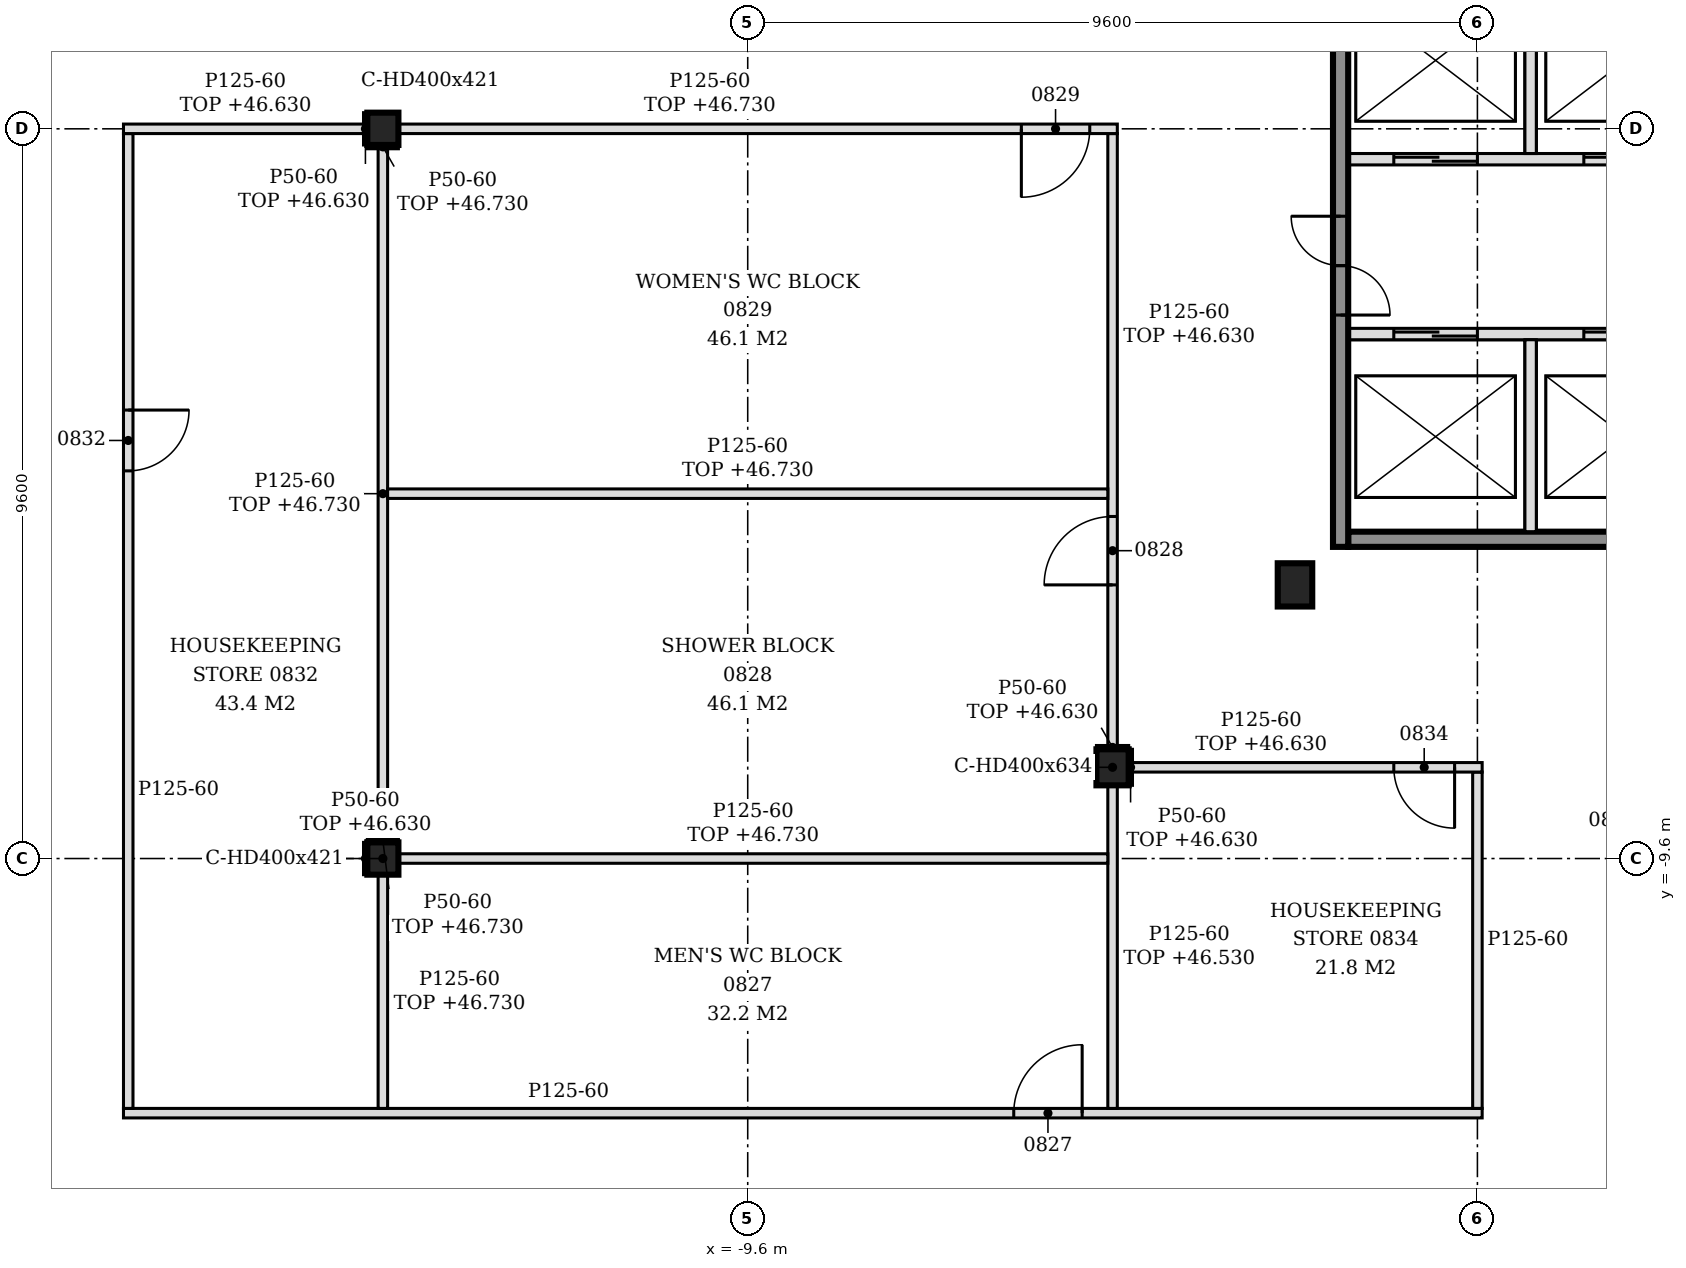
"""IFC4 building model, lengths in metres.
Left out: names, types, materials, properties, quantities, classifications, styles, units other than length and angle.
Written with IfcOpenShell. Run it as: python <this file> out.ifc"""

import sys

from ifc_helpers import new_model, si_unit, direction, frame, frame_2d, origin, origin_2d, place, context, subcontext, project, spatial, polyline, rectangle, i_section, outline, extrude, element, fill, save


model = new_model("IFC4")
c1 = context("Model", 3, precision=1e-05, world=origin(), true_north=direction((0.0, 1.0)))
c2 = subcontext(c1, "Body", "Model", "MODEL_VIEW")
j1 = project(units=[si_unit("LENGTHUNIT", "METRE"), si_unit("PLANEANGLEUNIT", "RADIAN")], contexts=[c1])
p1 = place(None, origin())
s1 = spatial("IfcSite", under=j1, at=p1, CompositionType="ELEMENT")
p2 = place(p1, origin())
s2 = spatial("IfcBuilding", under=s1, at=p2, CompositionType="ELEMENT")
p3 = place(p2, frame((0.0, 0.0, 43.8)))
s3 = spatial("IfcBuildingStorey", under=s2, at=p3, CompositionType="ELEMENT", Elevation=43.8)
p4 = place(p3, frame((-4.8, -8.4, -0.15), z_axis=(0.0, 0.0, 1.0), x_axis=(1.0, 0.0, 0.0)))
e1 = element("IfcColumn", 1, at=p4, inside=s3, PredefinedType="COLUMN", context=c2, shape_type="SweptSolid", body=[
    extrude(i_section(OverallWidth=0.424, OverallDepth=0.474, WebThickness=0.048, FlangeThickness=0.077, FilletRadius=0.015, at=origin_2d()), origin(), (0.0, 0.0, 1.0), 3.6),
])
p5 = place(p3, frame((-2.4, -6.0, -0.15), z_axis=(0.0, 0.0, 1.0), x_axis=(1.0, 0.0, 0.0)))
e2 = element("IfcColumn", 2, at=p5, inside=s3, PredefinedType="COLUMN", context=c2, shape_type="SweptSolid", body=[
    extrude(i_section(OverallWidth=0.454, OverallDepth=0.569, WebThickness=0.078, FlangeThickness=0.125, FilletRadius=0.015, at=origin_2d()), origin(), (0.0, 0.0, 1.0), 3.6),
])
for number, where, z_axis, x_axis in (
    (3, (-14.4, -9.6, -0.15), (0.0, 0.0, 1.0), (1.0, 0.0, 0.0)),
    (4, (-14.4, 0.0, -0.15), (0.0, 0.0, 1.0), (1.0, 0.0, 0.0)),
):
    element("IfcColumn", number, at=place(p3, frame(where, z_axis=z_axis, x_axis=x_axis)), inside=s3, PredefinedType="COLUMN", context=c2, shape_type="SweptSolid", body=[
        extrude(i_section(OverallWidth=0.409, OverallDepth=0.425, WebThickness=0.033, FlangeThickness=0.052, FilletRadius=0.015, at=origin_2d()), origin(), (0.0, 0.0, 1.0), 3.6),
    ])
p6 = place(p3, frame((-1.7, -5.4, 0.0), z_axis=(0.0, 0.0, 1.0), x_axis=(1.0, 0.0, 0.0)))
e5 = element("IfcWall", 5, at=p6, inside=s3, PredefinedType="SOLIDWALL", context=c2, shape_type="SweptSolid", body=[
    extrude(rectangle(XDim=7.9, YDim=0.2, at=frame_2d((3.95, 0.0))), origin(), (0.0, 0.0, 1.0), 3.45),
])
p7 = place(p3, frame((-1.7, -2.7, 0.0), z_axis=(0.0, 0.0, 1.0), x_axis=(1.0, 0.0, 0.0)))
e6 = element("IfcWall", 6, at=p7, inside=s3, PredefinedType="SOLIDWALL", context=c2, shape_type="SweptSolid", body=[
    extrude(rectangle(XDim=7.9, YDim=0.15, at=frame_2d((3.95, 0.0))), origin(), (0.0, 0.0, 1.0), 3.45),
])
p8 = place(p7, frame((0.6, 0.0, 0.0)))
e7 = element("IfcOpeningElement", 7, at=p8, cuts=e6, PredefinedType="OPENING", context=c2, shape_type="SweptSolid", body=[
    extrude(rectangle(XDim=1.1, YDim=2.1, at=frame_2d((0.55, 1.05))), frame((0.0, 0.085, 0.0), z_axis=(0.0, -1.0, 0.0), x_axis=(1.0, 0.0, 0.0)), (0.0, 0.0, 1.0), 0.17),
])
p9 = place(p7, frame((3.1, 0.0, 0.0)))
e8 = element("IfcOpeningElement", 8, at=p9, cuts=e6, PredefinedType="OPENING", context=c2, shape_type="SweptSolid", body=[
    extrude(rectangle(XDim=1.1, YDim=2.1, at=frame_2d((0.55, 1.05))), frame((0.0, 0.085, 0.0), z_axis=(0.0, -1.0, 0.0), x_axis=(1.0, 0.0, 0.0)), (0.0, 0.0, 1.0), 0.17),
])
p10 = place(p3, frame((-1.7, -0.4, 0.0), z_axis=(0.0, 0.0, 1.0), x_axis=(1.0, 0.0, 0.0)))
e9 = element("IfcWall", 9, at=p10, inside=s3, PredefinedType="SOLIDWALL", context=c2, shape_type="SweptSolid", body=[
    extrude(rectangle(XDim=15.925, YDim=0.15, at=frame_2d((7.962, 0.0))), origin(), (0.0, 0.0, 1.0), 3.45),
])
p11 = place(p10, frame((0.6, 0.0, 0.0)))
e10 = element("IfcOpeningElement", 10, at=p11, cuts=e9, PredefinedType="OPENING", context=c2, shape_type="SweptSolid", body=[
    extrude(rectangle(XDim=1.1, YDim=2.1, at=frame_2d((0.55, 1.05))), frame((0.0, 0.085, 0.0), z_axis=(0.0, -1.0, 0.0), x_axis=(1.0, 0.0, 0.0)), (0.0, 0.0, 1.0), 0.17),
])
p12 = place(p10, frame((3.1, 0.0, 0.0)))
e11 = element("IfcOpeningElement", 11, at=p12, cuts=e9, PredefinedType="OPENING", context=c2, shape_type="SweptSolid", body=[
    extrude(rectangle(XDim=1.1, YDim=2.1, at=frame_2d((0.55, 1.05))), frame((0.0, 0.085, 0.0), z_axis=(0.0, -1.0, 0.0), x_axis=(1.0, 0.0, 0.0)), (0.0, 0.0, 1.0), 0.17),
])
p13 = place(p10, frame((11.575, 0.0, 0.0)))
e12 = element("IfcOpeningElement", 12, at=p13, cuts=e9, PredefinedType="OPENING", context=c2, shape_type="SweptSolid", body=[
    extrude(rectangle(XDim=1.2, YDim=2.1, at=frame_2d((0.6, 1.05))), frame((0.0, 0.085, 0.0), z_axis=(0.0, -1.0, 0.0), x_axis=(1.0, 0.0, 0.0)), (0.0, 0.0, 1.0), 0.17),
])
p14 = place(p10, frame((14.125, 0.0, 0.0)))
e13 = element("IfcOpeningElement", 13, at=p14, cuts=e9, PredefinedType="OPENING", context=c2, shape_type="SweptSolid", body=[
    extrude(rectangle(XDim=1.2, YDim=2.1, at=frame_2d((0.6, 1.05))), frame((0.0, 0.085, 0.0), z_axis=(0.0, -1.0, 0.0), x_axis=(1.0, 0.0, 0.0)), (0.0, 0.0, 1.0), 0.17),
])
p15 = place(p3, frame((-1.8, -5.5, 0.0), z_axis=(0.0, 0.0, 1.0), x_axis=(0.0, 1.0, 0.0)))
e14 = element("IfcWall", 14, at=p15, inside=s3, PredefinedType="SOLIDWALL", context=c2, shape_type="SweptSolid", body=[
    extrude(rectangle(XDim=15.8, YDim=0.2, at=frame_2d((7.9, 0.0))), origin(), (0.0, 0.0, 1.0), 3.45),
])
p16 = place(p15, frame((3.05, 0.0, 0.0)))
e15 = element("IfcOpeningElement", 15, at=p16, cuts=e14, PredefinedType="OPENING", context=c2, shape_type="SweptSolid", body=[
    extrude(rectangle(XDim=1.3, YDim=2.1, at=frame_2d((0.65, 1.05))), frame((0.0, 0.11, 0.0), z_axis=(0.0, -1.0, 0.0), x_axis=(1.0, 0.0, 0.0)), (0.0, 0.0, 1.0), 0.22),
])
p17 = place(p15, frame((11.45, 0.0, 0.0)))
e16 = element("IfcOpeningElement", 16, at=p17, cuts=e14, PredefinedType="OPENING", context=c2, shape_type="SweptSolid", body=[
    extrude(rectangle(XDim=1.3, YDim=2.1, at=frame_2d((0.65, 1.05))), frame((0.0, 0.11, 0.0), z_axis=(0.0, -1.0, 0.0), x_axis=(1.0, 0.0, 0.0)), (0.0, 0.0, 1.0), 0.22),
])
p18 = place(p3, frame((0.7, -5.3, 0.0), z_axis=(0.0, 0.0, 1.0), x_axis=(0.0, 1.0, 0.0)))
e17 = element("IfcWall", 17, at=p18, inside=s3, PredefinedType="SOLIDWALL", context=c2, shape_type="SweptSolid", body=[
    extrude(rectangle(XDim=2.525, YDim=0.15, at=frame_2d((1.263, 0.0))), origin(), (0.0, 0.0, 1.0), 3.45),
])
p19 = place(p3, frame((0.7, -0.325, 0.0), z_axis=(0.0, 0.0, 1.0), x_axis=(0.0, 1.0, 0.0)))
e18 = element("IfcWall", 18, at=p19, inside=s3, PredefinedType="SOLIDWALL", context=c2, shape_type="SweptSolid", body=[
    extrude(rectangle(XDim=2.45, YDim=0.15, at=frame_2d((1.225, 0.0))), origin(), (0.0, 0.0, 1.0), 3.45),
])
p20 = place(p3, frame((-17.812, -12.95, 0.0), z_axis=(0.0, 0.0, 1.0), x_axis=(1.0, 0.0, 0.0)))
e19 = element("IfcWall", 19, at=p20, inside=s3, PredefinedType="PARTITIONING", context=c2, shape_type="SweptSolid", body=[
    extrude(outline(polyline([(0.0, 0.0), (17.875, 0.0), (17.875, 3.45), (13.163, 3.45), (13.16, 2.73), (12.863, 2.73), (12.861, 3.45), (3.562, 3.45), (3.561, 2.93), (3.262, 2.93), (3.26, 3.45), (0.0, 3.45), (0.0, 0.0)])), frame((0.0, 0.062, 0.0), z_axis=(0.0, -1.0, 0.0), x_axis=(1.0, 0.0, 0.0)), (0.0, 0.0, 1.0), 0.125),
])
p21 = place(p20, frame((11.712, 0.0, 0.0)))
e20 = element("IfcOpeningElement", 20, at=p21, cuts=e19, PredefinedType="OPENING", context=c2, shape_type="SweptSolid", body=[
    extrude(rectangle(XDim=0.9, YDim=2.1, at=frame_2d((0.45, 1.05))), frame((0.0, 0.073, 0.0), z_axis=(0.0, -1.0, 0.0), x_axis=(1.0, 0.0, 0.0)), (0.0, 0.0, 1.0), 0.145),
])
p22 = place(p3, frame((-17.75, -12.887, 0.0), z_axis=(0.0, 0.0, 1.0), x_axis=(0.0, 1.0, 0.0)))
e21 = element("IfcWall", 21, at=p22, inside=s3, PredefinedType="PARTITIONING", context=c2, shape_type="SweptSolid", body=[
    extrude(outline(polyline([(0.0, 0.0), (12.825, 0.0), (12.825, 2.83), (12.778, 2.83), (12.775, 3.45), (8.198, 3.45), (8.196, 2.83), (7.978, 2.83), (7.976, 3.45), (3.397, 3.45), (3.396, 2.83), (3.177, 2.83), (3.176, 3.45), (0.0, 3.45), (0.0, 0.0)])), frame((0.0, 0.062, 0.0), z_axis=(0.0, -1.0, 0.0), x_axis=(1.0, 0.0, 0.0)), (0.0, 0.0, 1.0), 0.125),
])
p23 = place(p22, frame((8.387, 0.0, 0.0)))
e22 = element("IfcOpeningElement", 22, at=p23, cuts=e21, PredefinedType="OPENING", context=c2, shape_type="SweptSolid", body=[
    extrude(rectangle(XDim=0.8, YDim=2.1, at=frame_2d((0.4, 1.05))), frame((0.0, 0.073, 0.0), z_axis=(0.0, -1.0, 0.0), x_axis=(1.0, 0.0, 0.0)), (0.0, 0.0, 1.0), 0.145),
])
p24 = place(p3, frame((-14.4, -12.887, 0.0), z_axis=(0.0, 0.0, 1.0), x_axis=(0.0, 1.0, 0.0)))
e23 = element("IfcWall", 23, at=p24, inside=s3, PredefinedType="PARTITIONING", context=c2, shape_type="SweptSolid", body=[
    extrude(rectangle(XDim=3.075, YDim=0.125, at=frame_2d((1.538, 0.0))), origin(), (0.0, 0.0, 1.0), 2.93),
])
p25 = place(p3, frame((-4.8, -12.887, 0.0), z_axis=(0.0, 0.0, 1.0), x_axis=(0.0, 1.0, 0.0)))
e24 = element("IfcWall", 24, at=p25, inside=s3, PredefinedType="PARTITIONING", context=c2, shape_type="SweptSolid", body=[
    extrude(rectangle(XDim=4.25, YDim=0.125, at=frame_2d((2.125, 0.0))), origin(), (0.0, 0.0, 1.0), 2.73),
])
p26 = place(p3, frame((0.0, -12.887, 0.0), z_axis=(0.0, 0.0, 1.0), x_axis=(0.0, 1.0, 0.0)))
e25 = element("IfcWall", 25, at=p26, inside=s3, PredefinedType="PARTITIONING", context=c2, shape_type="SweptSolid", body=[
    extrude(outline(polyline([(0.0, 0.0), (4.425, 0.0), (4.425, 2.83), (4.337, 2.83), (4.335, 3.45), (0.0, 3.45), (0.0, 0.0)])), frame((0.0, 0.062, 0.0), z_axis=(0.0, -1.0, 0.0), x_axis=(1.0, 0.0, 0.0)), (0.0, 0.0, 1.0), 0.125),
])
p27 = place(p3, frame((-14.196, -9.6, 0.0), z_axis=(0.0, 0.0, 1.0), x_axis=(1.0, 0.0, 0.0)))
e26 = element("IfcWall", 26, at=p27, inside=s3, PredefinedType="PARTITIONING", context=c2, shape_type="SweptSolid", body=[
    extrude(outline(polyline([(0.0, 0.0), (9.333, 0.0), (9.333, 2.73), (9.246, 2.73), (9.243, 2.93), (0.0, 2.93), (0.0, 0.0)])), frame((0.0, 0.062, 0.0), z_axis=(0.0, -1.0, 0.0), x_axis=(1.0, 0.0, 0.0)), (0.0, 0.0, 1.0), 0.125),
])
p28 = place(p3, frame((-14.4, -9.387, 0.0), z_axis=(0.0, 0.0, 1.0), x_axis=(0.0, 1.0, 0.0)))
e27 = element("IfcWall", 27, at=p28, inside=s3, PredefinedType="PARTITIONING", context=c2, shape_type="SweptSolid", body=[
    extrude(rectangle(XDim=9.175, YDim=0.125, at=frame_2d((4.587, 0.0))), origin(), (0.0, 0.0, 1.0), 2.93),
])
p29 = place(p3, frame((-4.588, -8.4, 0.0), z_axis=(0.0, 0.0, 1.0), x_axis=(1.0, 0.0, 0.0)))
e28 = element("IfcWall", 28, at=p29, inside=s3, PredefinedType="PARTITIONING", context=c2, shape_type="SweptSolid", body=[
    extrude(rectangle(XDim=4.65, YDim=0.125, at=frame_2d((2.325, 0.0))), origin(), (0.0, 0.0, 1.0), 2.83),
])
p30 = place(p29, frame((3.488, 0.0, 0.0)))
e29 = element("IfcOpeningElement", 29, at=p30, cuts=e28, PredefinedType="OPENING", context=c2, shape_type="SweptSolid", body=[
    extrude(rectangle(XDim=0.8, YDim=2.1, at=frame_2d((0.4, 1.05))), frame((0.0, 0.073, 0.0), z_axis=(0.0, -1.0, 0.0), x_axis=(1.0, 0.0, 0.0)), (0.0, 0.0, 1.0), 0.145),
])
p31 = place(p3, frame((-4.8, -8.163, 0.0), z_axis=(0.0, 0.0, 1.0), x_axis=(0.0, 1.0, 0.0)))
e30 = element("IfcWall", 30, at=p31, inside=s3, PredefinedType="PARTITIONING", context=c2, shape_type="SweptSolid", body=[
    extrude(rectangle(XDim=8.101, YDim=0.125, at=frame_2d((4.05, 0.0))), origin(), (0.0, 0.0, 1.0), 2.83),
])
p32 = place(p31, frame((2.163, 0.0, 0.0)))
e31 = element("IfcOpeningElement", 31, at=p32, cuts=e30, PredefinedType="OPENING", context=c2, shape_type="SweptSolid", body=[
    extrude(rectangle(XDim=0.9, YDim=2.1, at=frame_2d((0.45, 1.05))), frame((0.0, 0.073, 0.0), z_axis=(0.0, -1.0, 0.0), x_axis=(1.0, 0.0, 0.0)), (0.0, 0.0, 1.0), 0.145),
])
p33 = place(p3, frame((-14.337, -4.8, 0.0), z_axis=(0.0, 0.0, 1.0), x_axis=(1.0, 0.0, 0.0)))
e32 = element("IfcWall", 32, at=p33, inside=s3, PredefinedType="PARTITIONING", context=c2, shape_type="SweptSolid", body=[
    extrude(outline(polyline([(0.0, 0.0), (9.475, 0.0), (9.475, 2.83), (9.387, 2.83), (9.385, 2.93), (0.0, 2.93), (0.0, 0.0)])), frame((0.0, 0.062, 0.0), z_axis=(0.0, -1.0, 0.0), x_axis=(1.0, 0.0, 0.0)), (0.0, 0.0, 1.0), 0.125),
])
p34 = place(p3, frame((-17.812, 0.0, 0.0), z_axis=(0.0, 0.0, 1.0), x_axis=(1.0, 0.0, 0.0)))
e33 = element("IfcWall", 33, at=p34, inside=s3, PredefinedType="PARTITIONING", context=c2, shape_type="SweptSolid", body=[
    extrude(rectangle(XDim=3.208, YDim=0.125, at=frame_2d((1.604, 0.0))), origin(), (0.0, 0.0, 1.0), 2.83),
])
p35 = place(p3, frame((-14.196, 0.0, 0.0), z_axis=(0.0, 0.0, 1.0), x_axis=(1.0, 0.0, 0.0)))
e34 = element("IfcWall", 34, at=p35, inside=s3, PredefinedType="PARTITIONING", context=c2, shape_type="SweptSolid", body=[
    extrude(outline(polyline([(0.0, 0.0), (9.458, 0.0), (9.458, 2.83), (9.246, 2.83), (9.243, 2.93), (0.0, 2.93), (0.0, 0.0)])), frame((0.0, 0.062, 0.0), z_axis=(0.0, -1.0, 0.0), x_axis=(1.0, 0.0, 0.0)), (0.0, 0.0, 1.0), 0.125),
])
p36 = place(p35, frame((8.196, 0.0, 0.0)))
e35 = element("IfcOpeningElement", 35, at=p36, cuts=e34, PredefinedType="OPENING", context=c2, shape_type="SweptSolid", body=[
    extrude(rectangle(XDim=0.9, YDim=2.1, at=frame_2d((0.45, 1.05))), frame((0.0, 0.073, 0.0), z_axis=(0.0, -1.0, 0.0), x_axis=(1.0, 0.0, 0.0)), (0.0, 0.0, 1.0), 0.145),
])
p37 = place(p3, frame((-14.629, -9.812, 0.0), z_axis=(0.0, 0.0, 1.0), x_axis=(0.0, 1.0, 0.0)))
e36 = element("IfcWall", 36, at=p37, inside=s3, PredefinedType="PARTITIONING", context=c2, shape_type="SweptSolid", body=[
    extrude(rectangle(XDim=0.425, YDim=0.05, at=frame_2d((0.212, 0.0))), origin(), (0.0, 0.0, 1.0), 2.83),
])
p38 = place(p3, frame((-14.629, -0.212, 0.0), z_axis=(0.0, 0.0, 1.0), x_axis=(0.0, 1.0, 0.0)))
e37 = element("IfcWall", 37, at=p38, inside=s3, PredefinedType="PARTITIONING", context=c2, shape_type="SweptSolid", body=[
    extrude(rectangle(XDim=0.425, YDim=0.05, at=frame_2d((0.212, 0.0))), origin(), (0.0, 0.0, 1.0), 2.83),
])
p39 = place(p3, frame((-4.563, -8.637, 0.0), z_axis=(0.0, 0.0, 1.0), x_axis=(0.0, 1.0, 0.0)))
e38 = element("IfcWall", 38, at=p39, inside=s3, PredefinedType="PARTITIONING", context=c2, shape_type="SweptSolid", body=[
    extrude(rectangle(XDim=0.474, YDim=0.05, at=frame_2d((0.237, 0.0))), origin(), (0.0, 0.0, 1.0), 2.83),
])
p40 = place(p3, frame((-14.604, -9.363, 0.0), z_axis=(0.0, 0.0, 1.0), x_axis=(1.0, 0.0, 0.0)))
e39 = element("IfcWall", 39, at=p40, inside=s3, PredefinedType="PARTITIONING", context=c2, shape_type="SweptSolid", body=[
    extrude(rectangle(XDim=0.409, YDim=0.05, at=frame_2d((0.205, 0.0))), origin(), (0.0, 0.0, 1.0), 2.93),
])
p41 = place(p3, frame((-5.012, -8.138, 0.0), z_axis=(0.0, 0.0, 1.0), x_axis=(1.0, 0.0, 0.0)))
e40 = element("IfcWall", 40, at=p41, inside=s3, PredefinedType="PARTITIONING", context=c2, shape_type="SweptSolid", body=[
    extrude(rectangle(XDim=0.424, YDim=0.05, at=frame_2d((0.212, 0.0))), origin(), (0.0, 0.0, 1.0), 2.83),
])
p42 = place(p3, frame((-14.604, -0.238, 0.0), z_axis=(0.0, 0.0, 1.0), x_axis=(1.0, 0.0, 0.0)))
e41 = element("IfcWall", 41, at=p42, inside=s3, PredefinedType="PARTITIONING", context=c2, shape_type="SweptSolid", body=[
    extrude(rectangle(XDim=0.409, YDim=0.05, at=frame_2d((0.205, 0.0))), origin(), (0.0, 0.0, 1.0), 2.93),
])
p43 = place(p8, origin())
e42 = element("IfcDoor", 42, at=p43, inside=s3, OperationType="DOUBLE_DOOR_SLIDING", PredefinedType="DOOR", context=c2, shape_type="SweptSolid", body=[
    extrude(rectangle(XDim=1.1, YDim=2.1, at=frame_2d((0.55, 1.05))), frame((0.0, 0.025, 0.0), z_axis=(0.0, -1.0, 0.0), x_axis=(1.0, 0.0, 0.0)), (0.0, 0.0, 1.0), 0.05),
])
fill(e7, e42)
p44 = place(p9, origin())
e43 = element("IfcDoor", 43, at=p44, inside=s3, OperationType="DOUBLE_DOOR_SLIDING", PredefinedType="DOOR", context=c2, shape_type="SweptSolid", body=[
    extrude(rectangle(XDim=1.1, YDim=2.1, at=frame_2d((0.55, 1.05))), frame((0.0, 0.025, 0.0), z_axis=(0.0, -1.0, 0.0), x_axis=(1.0, 0.0, 0.0)), (0.0, 0.0, 1.0), 0.05),
])
fill(e8, e43)
p45 = place(p11, origin())
e44 = element("IfcDoor", 44, at=p45, inside=s3, OperationType="DOUBLE_DOOR_SLIDING", PredefinedType="DOOR", context=c2, shape_type="SweptSolid", body=[
    extrude(rectangle(XDim=1.1, YDim=2.1, at=frame_2d((0.55, 1.05))), frame((0.0, 0.025, 0.0), z_axis=(0.0, -1.0, 0.0), x_axis=(1.0, 0.0, 0.0)), (0.0, 0.0, 1.0), 0.05),
])
fill(e10, e44)
p46 = place(p12, origin())
e45 = element("IfcDoor", 45, at=p46, inside=s3, OperationType="DOUBLE_DOOR_SLIDING", PredefinedType="DOOR", context=c2, shape_type="SweptSolid", body=[
    extrude(rectangle(XDim=1.1, YDim=2.1, at=frame_2d((0.55, 1.05))), frame((0.0, 0.025, 0.0), z_axis=(0.0, -1.0, 0.0), x_axis=(1.0, 0.0, 0.0)), (0.0, 0.0, 1.0), 0.05),
])
fill(e11, e45)
p47 = place(p16, origin())
e46 = element("IfcDoor", 46, at=p47, inside=s3, OperationType="DOUBLE_DOOR_SINGLE_SWING", PredefinedType="DOOR", context=c2, shape_type="SweptSolid", body=[
    extrude(rectangle(XDim=1.3, YDim=2.1, at=frame_2d((0.65, 1.05))), frame((0.0, 0.025, 0.0), z_axis=(0.0, -1.0, 0.0), x_axis=(1.0, 0.0, 0.0)), (0.0, 0.0, 1.0), 0.05),
])
fill(e15, e46)
p48 = place(p21, origin())
e47 = element("IfcDoor", 47, at=p48, inside=s3, OperationType="SINGLE_SWING_RIGHT", PredefinedType="DOOR", context=c2, shape_type="SweptSolid", body=[
    extrude(rectangle(XDim=0.9, YDim=2.1, at=frame_2d((0.45, 1.05))), frame((0.0, 0.025, 0.0), z_axis=(0.0, -1.0, 0.0), x_axis=(1.0, 0.0, 0.0)), (0.0, 0.0, 1.0), 0.05),
])
fill(e20, e47)
p49 = place(p32, origin())
e48 = element("IfcDoor", 48, at=p49, inside=s3, OperationType="SINGLE_SWING_LEFT", PredefinedType="DOOR", context=c2, shape_type="SweptSolid", body=[
    extrude(rectangle(XDim=0.9, YDim=2.1, at=frame_2d((0.45, 1.05))), frame((0.0, 0.025, 0.0), z_axis=(0.0, -1.0, 0.0), x_axis=(1.0, 0.0, 0.0)), (0.0, 0.0, 1.0), 0.05),
])
fill(e31, e48)
p50 = place(p36, frame((0.9, 0.0, 0.0), z_axis=(0.0, 0.0, 1.0), x_axis=(-1.0, 0.0, 0.0)))
e49 = element("IfcDoor", 49, at=p50, inside=s3, OperationType="SINGLE_SWING_RIGHT", PredefinedType="DOOR", context=c2, shape_type="SweptSolid", body=[
    extrude(rectangle(XDim=0.9, YDim=2.1, at=frame_2d((0.45, 1.05))), frame((0.0, 0.025, 0.0), z_axis=(0.0, -1.0, 0.0), x_axis=(1.0, 0.0, 0.0)), (0.0, 0.0, 1.0), 0.05),
])
fill(e35, e49)
p51 = place(p23, frame((0.8, 0.0, 0.0), z_axis=(0.0, 0.0, 1.0), x_axis=(-1.0, 0.0, 0.0)))
e50 = element("IfcDoor", 50, at=p51, inside=s3, OperationType="SINGLE_SWING_LEFT", PredefinedType="DOOR", context=c2, shape_type="SweptSolid", body=[
    extrude(rectangle(XDim=0.8, YDim=2.1, at=frame_2d((0.4, 1.05))), frame((0.0, 0.025, 0.0), z_axis=(0.0, -1.0, 0.0), x_axis=(1.0, 0.0, 0.0)), (0.0, 0.0, 1.0), 0.05),
])
fill(e22, e50)
p52 = place(p30, frame((0.8, 0.0, 0.0), z_axis=(0.0, 0.0, 1.0), x_axis=(-1.0, 0.0, 0.0)))
e51 = element("IfcDoor", 51, at=p52, inside=s3, OperationType="SINGLE_SWING_LEFT", PredefinedType="DOOR", context=c2, shape_type="SweptSolid", body=[
    extrude(rectangle(XDim=0.8, YDim=2.1, at=frame_2d((0.4, 1.05))), frame((0.0, 0.025, 0.0), z_axis=(0.0, -1.0, 0.0), x_axis=(1.0, 0.0, 0.0)), (0.0, 0.0, 1.0), 0.05),
])
fill(e29, e51)
save(model, sys.argv[1])
